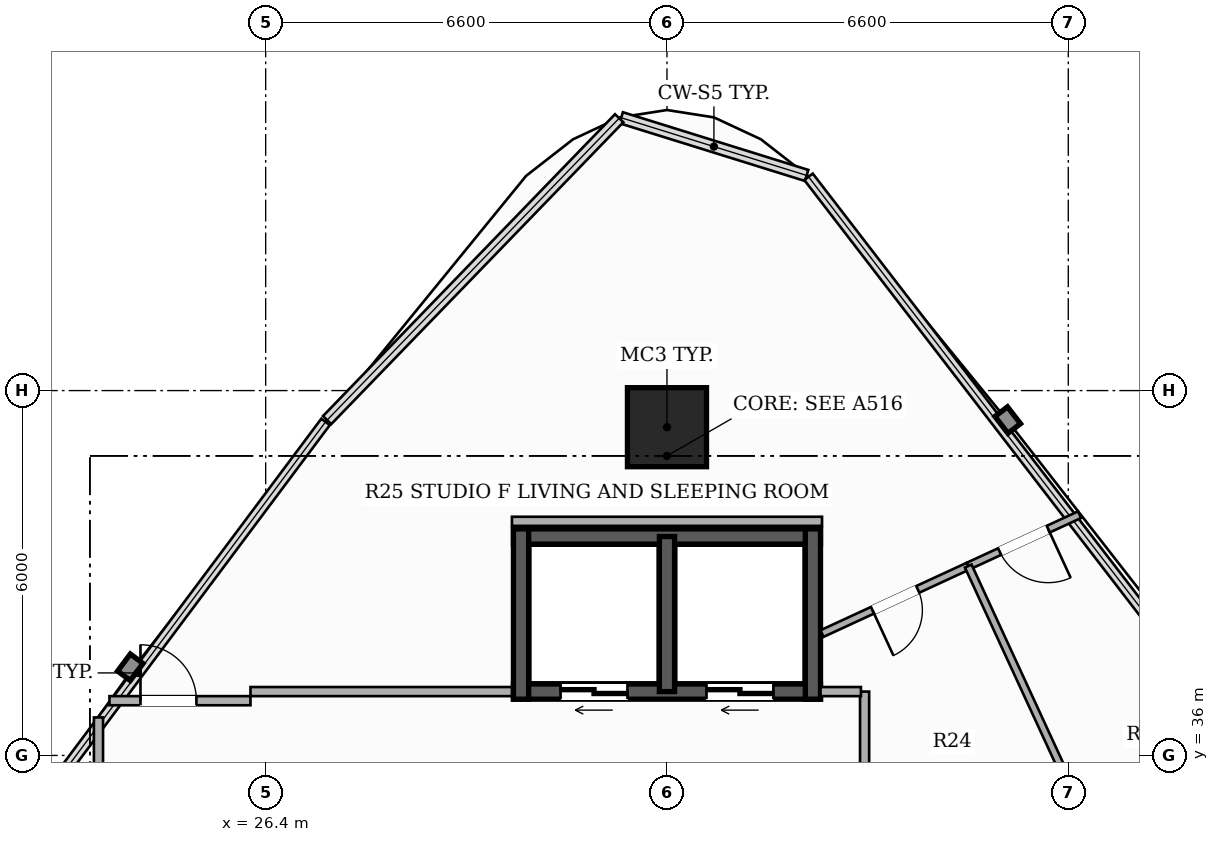
"""IFC4 building model, lengths in metres.
Left out: names, types, materials, properties, quantities, classifications, styles, units other than length and angle.
Written with IfcOpenShell. Run it as: python <this file> out.ifc"""

import sys

from ifc_helpers import new_model, si_unit, direction, frame, frame_2d, origin, origin_2d, place, context, subcontext, project, spatial, rectangle, hollow_rectangle, extrude, element, fill, save


model = new_model("IFC4")
c1 = context("Model", 3, precision=1e-05, world=origin(), true_north=direction((0.0, 1.0)))
c2 = subcontext(c1, "Body", "Model", "MODEL_VIEW")
j1 = project(units=[si_unit("LENGTHUNIT", "METRE"), si_unit("PLANEANGLEUNIT", "RADIAN")], contexts=[c1])
p1 = place(None, origin())
s1 = spatial("IfcSite", under=j1, at=p1, CompositionType="ELEMENT")
p2 = place(p1, origin())
s2 = spatial("IfcBuilding", under=s1, at=p2, CompositionType="ELEMENT")
p3 = place(p2, frame((0.0, 0.0, 203.0)))
s3 = spatial("IfcBuildingStorey", under=s2, at=p3, CompositionType="ELEMENT", Elevation=203.0)
p4 = place(p3, frame((35.525, 37.05, 0.0), z_axis=(0.0, 0.0, 1.0), x_axis=(-1.0, 0.0, 0.0)))
e1 = element("IfcWall", 1, at=p4, inside=s3, PredefinedType="SHEAR", context=c2, shape_type="SweptSolid", body=[
    extrude(rectangle(XDim=5.05, YDim=0.25, at=frame_2d((2.525, 0.0))), origin(), (0.0, 0.0, 1.0), 3.3),
])
p5 = place(p4, frame((3.175, 0.0, 0.0)))
e2 = element("IfcOpeningElement", 2, at=p5, cuts=e1, PredefinedType="OPENING", context=c2, shape_type="SweptSolid", body=[
    extrude(rectangle(XDim=1.1, YDim=2.2, at=frame_2d((0.55, 1.1))), frame((0.0, 0.135, 0.0), z_axis=(0.0, -1.0, 0.0), x_axis=(1.0, 0.0, 0.0)), (0.0, 0.0, 1.0), 0.27),
])
p6 = place(p4, frame((0.775, 0.0, 0.0)))
e3 = element("IfcOpeningElement", 3, at=p6, cuts=e1, PredefinedType="OPENING", context=c2, shape_type="SweptSolid", body=[
    extrude(rectangle(XDim=1.1, YDim=2.2, at=frame_2d((0.55, 1.1))), frame((0.0, 0.135, 0.0), z_axis=(0.0, -1.0, 0.0), x_axis=(1.0, 0.0, 0.0)), (0.0, 0.0, 1.0), 0.27),
])
p7 = place(p3, frame((30.475, 39.6, 0.0), z_axis=(0.0, 0.0, 1.0), x_axis=(1.0, 0.0, 0.0)))
e4 = element("IfcWall", 4, at=p7, inside=s3, PredefinedType="SHEAR", context=c2, shape_type="SweptSolid", body=[
    extrude(rectangle(XDim=5.05, YDim=0.25, at=frame_2d((2.525, 0.0))), origin(), (0.0, 0.0, 1.0), 3.3),
])
for number, where, z_axis, x_axis in (
    (5, (30.6, 36.925, 0.0), (0.0, 0.0, 1.0), (0.0, 1.0, 0.0)),
    (6, (35.4, 36.925, 0.0), (0.0, 0.0, 1.0), (0.0, 1.0, 0.0)),
):
    element("IfcWall", number, at=place(p3, frame(where, z_axis=z_axis, x_axis=x_axis)), inside=s3, PredefinedType="SHEAR", context=c2, shape_type="SweptSolid", body=[
        extrude(rectangle(XDim=2.8, YDim=0.25, at=frame_2d((1.4, 0.0))), origin(), (0.0, 0.0, 1.0), 3.3),
    ])
p8 = place(p3, frame((33.0, 37.05, 0.0), z_axis=(0.0, 0.0, 1.0), x_axis=(0.0, 1.0, 0.0)))
e7 = element("IfcWall", 7, at=p8, inside=s3, PredefinedType="SHEAR", context=c2, shape_type="SweptSolid", body=[
    extrude(rectangle(XDim=2.55, YDim=0.25, at=frame_2d((1.275, 0.0))), origin(), (0.0, 0.0, 1.0), 3.3),
])
p9 = place(p3, frame((33.0, 41.398, 0.0), z_axis=(0.0, 0.0, 1.0), x_axis=(1.0, 0.0, 0.0)))
e8 = element("IfcColumn", 8, at=p9, inside=s3, PredefinedType="COLUMN", context=c2, shape_type="SweptSolid", body=[
    extrude(hollow_rectangle(XDim=1.3, YDim=1.3, WallThickness=0.04, at=origin_2d()), origin(), (0.0, 0.0, 1.0), 3.3),
])
p10 = place(p3, frame((36.25, 34.76, 0.0), z_axis=(0.0, 0.0, 1.0), x_axis=(0.0, 1.0, 0.0)))
e9 = element("IfcWall", 9, at=p10, inside=s3, PredefinedType="PARTITIONING", context=c2, shape_type="SweptSolid", body=[
    extrude(rectangle(XDim=2.29, YDim=0.15, at=frame_2d((1.145, 0.0))), origin(), (0.0, 0.0, 1.0), 2.425),
])
p11 = place(p3, frame((35.525, 37.05, 0.0), z_axis=(0.0, 0.0, 1.0), x_axis=(1.0, 0.0, 0.0)))
e10 = element("IfcWall", 10, at=p11, inside=s3, PredefinedType="PARTITIONING", context=c2, shape_type="SweptSolid", body=[
    extrude(rectangle(XDim=0.665, YDim=0.15, at=frame_2d((0.333, 0.0))), origin(), (0.0, 0.0, 1.0), 2.425),
])
p12 = place(p3, frame((23.65, 23.91, 0.0), z_axis=(0.0, 0.0, 1.0), x_axis=(0.0, 1.0, 0.0)))
e11 = element("IfcWall", 11, at=p12, inside=s3, PredefinedType="PARTITIONING", context=c2, shape_type="SweptSolid", body=[
    extrude(rectangle(XDim=12.715, YDim=0.15, at=frame_2d((6.357, 0.0))), origin(), (0.0, 0.0, 1.0), 2.492),
])
p13 = place(p12, frame((5.917, 0.0, 0.0)))
e12 = element("IfcOpeningElement", 12, at=p13, cuts=e11, PredefinedType="OPENING", context=c2, shape_type="SweptSolid", body=[
    extrude(rectangle(XDim=0.88, YDim=2.1, at=frame_2d((0.44, 1.05))), frame((0.0, 0.085, 0.0), z_axis=(0.0, -1.0, 0.0), x_axis=(1.0, 0.0, 0.0)), (0.0, 0.0, 1.0), 0.17),
])
p14 = place(p3, frame((23.831, 36.9, 0.0), z_axis=(0.0, 0.0, 1.0), x_axis=(1.0, 0.0, 0.0)))
e13 = element("IfcWall", 13, at=p14, inside=s3, PredefinedType="PARTITIONING", context=c2, shape_type="SweptSolid", body=[
    extrude(rectangle(XDim=2.319, YDim=0.15, at=frame_2d((1.159, 0.0))), origin(), (0.0, 0.0, 1.0), 2.619),
])
p15 = place(p14, frame((0.51, 0.0, 0.0)))
e14 = element("IfcOpeningElement", 14, at=p15, cuts=e13, PredefinedType="OPENING", context=c2, shape_type="SweptSolid", body=[
    extrude(rectangle(XDim=0.92, YDim=2.15, at=frame_2d((0.46, 1.075))), frame((0.0, 0.085, 0.0), z_axis=(0.0, -1.0, 0.0), x_axis=(1.0, 0.0, 0.0)), (0.0, 0.0, 1.0), 0.17),
])
p16 = place(p3, frame((26.15, 37.05, 0.0), z_axis=(0.0, 0.0, 1.0), x_axis=(1.0, 0.0, 0.0)))
e15 = element("IfcWall", 15, at=p16, inside=s3, PredefinedType="PARTITIONING", context=c2, shape_type="SweptSolid", body=[
    extrude(rectangle(XDim=4.3, YDim=0.15, at=frame_2d((2.15, 0.0))), origin(), (0.0, 0.0, 1.0), 2.425),
])
p17 = place(p3, frame((30.45, 39.85, 0.0), z_axis=(0.0, 0.0, 1.0), x_axis=(1.0, 0.0, 0.0)))
e16 = element("IfcWall", 16, at=p17, inside=s3, PredefinedType="PARTITIONING", context=c2, shape_type="SweptSolid", body=[
    extrude(rectangle(XDim=5.1, YDim=0.15, at=frame_2d((2.55, 0.0))), origin(), (0.0, 0.0, 1.0), 2.492),
])
p18 = place(p3, frame((37.955, 39.114, 0.0), z_axis=(0.0, 0.0, 1.0), x_axis=(-0.907945896046, -0.41908740121, 0.0)))
e17 = element("IfcWall", 17, at=p18, inside=s3, PredefinedType="PARTITIONING", context=c2, shape_type="SweptSolid", body=[
    extrude(rectangle(XDim=2.649, YDim=0.12, at=frame_2d((1.324, 0.0))), origin(), (0.0, 0.0, 1.0), 2.492),
])
p19 = place(p18, frame((0.914, 0.0, 0.0)))
e18 = element("IfcOpeningElement", 18, at=p19, cuts=e17, PredefinedType="OPENING", context=c2, shape_type="SweptSolid", body=[
    extrude(rectangle(XDim=0.82, YDim=2.1, at=frame_2d((0.41, 1.05))), frame((0.0, 0.07, 0.0), z_axis=(0.0, -1.0, 0.0), x_axis=(1.0, 0.0, 0.0)), (0.0, 0.0, 1.0), 0.14),
])
p20 = place(p3, frame((39.786, 39.959, 0.0), z_axis=(0.0, 0.0, 1.0), x_axis=(-0.90796292821, -0.419050499338, 0.0)))
e19 = element("IfcWall", 19, at=p20, inside=s3, PredefinedType="PARTITIONING", context=c2, shape_type="SweptSolid", body=[
    extrude(rectangle(XDim=2.016, YDim=0.12, at=frame_2d((1.008, 0.0))), origin(), (0.0, 0.0, 1.0), 3.06),
])
p21 = place(p20, frame((0.568, 0.0, 0.0)))
e20 = element("IfcOpeningElement", 20, at=p21, cuts=e19, PredefinedType="OPENING", context=c2, shape_type="SweptSolid", body=[
    extrude(rectangle(XDim=0.88, YDim=2.1, at=frame_2d((0.44, 1.05))), frame((0.0, 0.07, 0.0), z_axis=(0.0, -1.0, 0.0), x_axis=(1.0, 0.0, 0.0)), (0.0, 0.0, 1.0), 0.14),
])
p22 = place(p3, frame((37.955, 39.114, 0.0), z_axis=(0.0, 0.0, 1.0), x_axis=(0.41911319203, -0.907933991139, 0.0)))
e21 = element("IfcWall", 21, at=p22, inside=s3, PredefinedType="PARTITIONING", context=c2, shape_type="SweptSolid", body=[
    extrude(rectangle(XDim=5.628, YDim=0.12, at=frame_2d((2.814, 0.0))), origin(), (0.0, 0.0, 1.0), 2.492),
])
p23 = place(p5, origin())
e22 = element("IfcDoor", 22, at=p23, inside=s3, OperationType="DOUBLE_DOOR_SLIDING", PredefinedType="DOOR", context=c2, shape_type="SweptSolid", body=[
    extrude(rectangle(XDim=1.1, YDim=2.2, at=frame_2d((0.55, 1.1))), frame((0.0, 0.025, 0.0), z_axis=(0.0, -1.0, 0.0), x_axis=(1.0, 0.0, 0.0)), (0.0, 0.0, 1.0), 0.05),
])
fill(e2, e22)
p24 = place(p6, origin())
e23 = element("IfcDoor", 23, at=p24, inside=s3, OperationType="DOUBLE_DOOR_SLIDING", PredefinedType="DOOR", context=c2, shape_type="SweptSolid", body=[
    extrude(rectangle(XDim=1.1, YDim=2.2, at=frame_2d((0.55, 1.1))), frame((0.0, 0.025, 0.0), z_axis=(0.0, -1.0, 0.0), x_axis=(1.0, 0.0, 0.0)), (0.0, 0.0, 1.0), 0.05),
])
fill(e3, e23)
p25 = place(p15, origin())
e24 = element("IfcDoor", 24, at=p25, inside=s3, OperationType="SINGLE_SWING_LEFT", PredefinedType="DOOR", context=c2, shape_type="SweptSolid", body=[
    extrude(rectangle(XDim=0.92, YDim=2.15, at=frame_2d((0.46, 1.075))), frame((0.0, 0.025, 0.0), z_axis=(0.0, -1.0, 0.0), x_axis=(1.0, 0.0, 0.0)), (0.0, 0.0, 1.0), 0.05),
])
fill(e14, e24)
p26 = place(p19, origin())
e25 = element("IfcDoor", 25, at=p26, inside=s3, OperationType="SINGLE_SWING_RIGHT", PredefinedType="DOOR", context=c2, shape_type="SweptSolid", body=[
    extrude(rectangle(XDim=0.82, YDim=2.1, at=frame_2d((0.41, 1.05))), frame((0.0, 0.025, 0.0), z_axis=(0.0, -1.0, 0.0), x_axis=(1.0, 0.0, 0.0)), (0.0, 0.0, 1.0), 0.05),
])
fill(e18, e25)
p27 = place(p21, origin())
e26 = element("IfcDoor", 26, at=p27, inside=s3, OperationType="SINGLE_SWING_LEFT", PredefinedType="DOOR", context=c2, shape_type="SweptSolid", body=[
    extrude(rectangle(XDim=0.88, YDim=2.1, at=frame_2d((0.44, 1.05))), frame((0.0, 0.025, 0.0), z_axis=(0.0, -1.0, 0.0), x_axis=(1.0, 0.0, 0.0)), (0.0, 0.0, 1.0), 0.05),
])
fill(e20, e26)
save(model, sys.argv[1])
